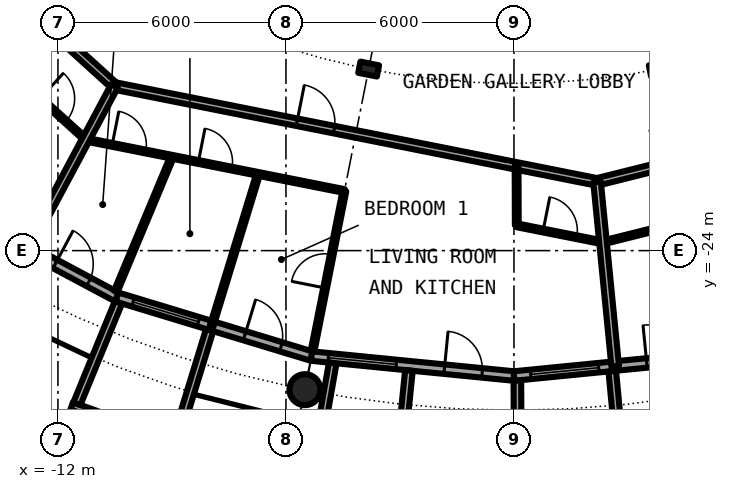
"""IFC4 building model, lengths in metres.
Left out: names, types, materials, properties, quantities, classifications, styles, units other than length and angle.
Written with IfcOpenShell. Run it as: python <this file> out.ifc"""

import sys

from ifc_helpers import new_model, si_unit, direction, frame, frame_2d, origin, origin_2d, place, context, subcontext, project, spatial, rectangle, circle, hollow_circle, i_section, extrude, element, fill, save


model = new_model("IFC4")
c1 = context("Model", 3, precision=1e-05, world=origin(), true_north=direction((0.0, 1.0)))
c2 = subcontext(c1, "Body", "Model", "MODEL_VIEW")
j1 = project(units=[si_unit("LENGTHUNIT", "METRE"), si_unit("PLANEANGLEUNIT", "RADIAN")], contexts=[c1])
p1 = place(None, origin())
s1 = spatial("IfcSite", under=j1, at=p1, CompositionType="ELEMENT")
p2 = place(p1, origin())
s2 = spatial("IfcBuilding", under=s1, at=p2, CompositionType="ELEMENT")
p3 = place(p2, frame((0.0, 0.0, 151.3)))
s3 = spatial("IfcBuildingStorey", under=s2, at=p3, CompositionType="ELEMENT", Elevation=151.3)
p4 = place(p3, frame((-5.501, -27.658, 0.0), z_axis=(0.0, 0.0, 1.0), x_axis=(1.0, 0.0, 0.0)))
e1 = element("IfcColumn", 1, at=p4, inside=s3, PredefinedType="COLUMN", context=c2, shape_type="SweptSolid", body=[
    extrude(hollow_circle(Radius=0.406, WallThickness=0.04, at=origin_2d()), origin(), (0.0, 0.0, 1.0), 3.05),
])
for number, where, z_axis, x_axis in (
    (2, (-3.824, -19.223, 0.0), (0.0, 0.0, 1.0), (-0.195, -0.981, 0.0)),
    (3, (3.824, -19.223, 0.0), (0.0, 0.0, 1.0), (0.195, -0.981, 0.0)),
):
    element("IfcColumn", number, at=place(p3, frame(where, z_axis=z_axis, x_axis=x_axis)), inside=s3, PredefinedType="COLUMN", context=c2, shape_type="SweptSolid", body=[
        extrude(i_section(OverallWidth=0.3, OverallDepth=0.5, WebThickness=0.014, FlangeThickness=0.028, FilletRadius=0.027, at=origin_2d()), origin(), (0.0, 0.0, 1.0), 3.05),
    ])
p5 = place(p3, frame((-15.167, -22.699, 0.0), z_axis=(0.0, 0.0, 1.0), x_axis=(0.881915646801, -0.471407246368, 0.0)))
e4 = element("IfcWall", 4, at=p5, inside=s3, PredefinedType="SOLIDWALL", context=c2, shape_type="SweptSolid", body=[
    extrude(rectangle(XDim=5.352, YDim=0.25, at=frame_2d((2.676, 0.0))), origin(), (0.0, 0.0, 1.0), 2.7),
])
p6 = place(p5, frame((0.441, 0.0, 0.3)))
e5 = element("IfcOpeningElement", 5, at=p6, cuts=e4, PredefinedType="OPENING", context=c2, shape_type="SweptSolid", body=[
    extrude(rectangle(XDim=1.8, YDim=2.1, at=frame_2d((0.9, 1.05))), frame((0.0, 0.135, 0.0), z_axis=(0.0, -1.0, 0.0), x_axis=(1.0, 0.0, 0.0)), (0.0, 0.0, 1.0), 0.27),
])
p7 = place(p5, frame((3.51, 0.0, 0.0)))
e6 = element("IfcOpeningElement", 6, at=p7, cuts=e4, PredefinedType="OPENING", context=c2, shape_type="SweptSolid", body=[
    extrude(rectangle(XDim=1.0, YDim=2.2, at=frame_2d((0.5, 1.1))), frame((0.0, 0.135, 0.0), z_axis=(0.0, -1.0, 0.0), x_axis=(1.0, 0.0, 0.0)), (0.0, 0.0, 1.0), 0.27),
])
p8 = place(p3, frame((-10.447, -25.222, 0.0), z_axis=(0.0, 0.0, 1.0), x_axis=(0.956965678721, -0.290201119486, 0.0)))
e7 = element("IfcWall", 7, at=p8, inside=s3, PredefinedType="SOLIDWALL", context=c2, shape_type="SweptSolid", body=[
    extrude(rectangle(XDim=5.351, YDim=0.25, at=frame_2d((2.676, 0.0))), origin(), (0.0, 0.0, 1.0), 2.7),
])
p9 = place(p8, frame((0.441, 0.0, 0.3)))
e8 = element("IfcOpeningElement", 8, at=p9, cuts=e7, PredefinedType="OPENING", context=c2, shape_type="SweptSolid", body=[
    extrude(rectangle(XDim=1.8, YDim=2.1, at=frame_2d((0.9, 1.05))), frame((0.0, 0.135, 0.0), z_axis=(0.0, -1.0, 0.0), x_axis=(1.0, 0.0, 0.0)), (0.0, 0.0, 1.0), 0.27),
])
p10 = place(p8, frame((3.51, 0.0, 0.0)))
e9 = element("IfcOpeningElement", 9, at=p10, cuts=e7, PredefinedType="OPENING", context=c2, shape_type="SweptSolid", body=[
    extrude(rectangle(XDim=1.0, YDim=2.2, at=frame_2d((0.5, 1.1))), frame((0.0, 0.135, 0.0), z_axis=(0.0, -1.0, 0.0), x_axis=(1.0, 0.0, 0.0)), (0.0, 0.0, 1.0), 0.27),
])
p11 = place(p3, frame((-11.638, -28.084, -0.03), z_axis=(0.0, 0.0, 1.0), x_axis=(0.941461077774, -0.337121697664, 0.0)))
e10 = element("IfcWall", 10, at=p11, inside=s3, PredefinedType="SOLIDWALL", context=c2, shape_type="SweptSolid", body=[
    extrude(rectangle(XDim=2.993, YDim=0.2, at=frame_2d((1.497, 0.0))), origin(), (0.0, 0.0, 1.0), 2.73),
])
p12 = place(p11, frame((0.457, 0.0, 0.33)))
e11 = element("IfcOpeningElement", 11, at=p12, cuts=e10, PredefinedType="OPENING", context=c2, shape_type="SweptSolid", body=[
    extrude(circle(Radius=1.04, at=frame_2d((1.04, 1.04))), frame((0.0, 0.11, 0.0), z_axis=(0.0, -1.0, 0.0), x_axis=(1.0, 0.0, 0.0)), (0.0, 0.0, 1.0), 0.22),
])
p13 = place(p3, frame((-10.409, -25.364, -0.03), z_axis=(0.0, 0.0, 1.0), x_axis=(-0.379509886562, -0.925187681501, 0.0)))
e12 = element("IfcWall", 12, at=p13, inside=s3, PredefinedType="SOLIDWALL", context=c2, shape_type="SweptSolid", body=[
    extrude(rectangle(XDim=2.883, YDim=0.2, at=frame_2d((1.441, 0.0))), origin(), (0.0, 0.0, 1.0), 2.73),
])
p14 = place(p3, frame((-8.009, -26.092, -0.03), z_axis=(0.0, 0.0, 1.0), x_axis=(-0.293406695073, -0.955987715029, 0.0)))
e13 = element("IfcWall", 13, at=p14, inside=s3, PredefinedType="SOLIDWALL", context=c2, shape_type="SweptSolid", body=[
    extrude(rectangle(XDim=3.006, YDim=0.2, at=frame_2d((1.503, 0.0))), origin(), (0.0, 0.0, 1.0), 2.73),
])
p15 = place(p3, frame((-5.326, -26.775, 0.0), z_axis=(0.0, 0.0, 1.0), x_axis=(0.995173996315, -0.098126026407, 0.0)))
e14 = element("IfcWall", 14, at=p15, inside=s3, PredefinedType="SOLIDWALL", context=c2, shape_type="SweptSolid", body=[
    extrude(rectangle(XDim=5.352, YDim=0.25, at=frame_2d((2.676, 0.0))), origin(), (0.0, 0.0, 1.0), 2.7),
])
p16 = place(p15, frame((0.441, 0.0, 0.3)))
e15 = element("IfcOpeningElement", 15, at=p16, cuts=e14, PredefinedType="OPENING", context=c2, shape_type="SweptSolid", body=[
    extrude(rectangle(XDim=1.8, YDim=2.1, at=frame_2d((0.9, 1.05))), frame((0.0, 0.135, 0.0), z_axis=(0.0, -1.0, 0.0), x_axis=(1.0, 0.0, 0.0)), (0.0, 0.0, 1.0), 0.27),
])
p17 = place(p15, frame((3.51, 0.0, 0.0)))
e16 = element("IfcOpeningElement", 16, at=p17, cuts=e14, PredefinedType="OPENING", context=c2, shape_type="SweptSolid", body=[
    extrude(rectangle(XDim=1.0, YDim=2.2, at=frame_2d((0.5, 1.1))), frame((0.0, 0.135, 0.0), z_axis=(0.0, -1.0, 0.0), x_axis=(1.0, 0.0, 0.0)), (0.0, 0.0, 1.0), 0.27),
])
p18 = place(p3, frame((-4.769, -26.956, -0.03), z_axis=(0.0, 0.0, 1.0), x_axis=(-0.174056778901, -0.984735618183, 0.0)))
e17 = element("IfcWall", 17, at=p18, inside=s3, PredefinedType="SOLIDWALL", context=c2, shape_type="SweptSolid", body=[
    extrude(rectangle(XDim=2.925, YDim=0.2, at=frame_2d((1.462, 0.0))), origin(), (0.0, 0.0, 1.0), 2.73),
])
p19 = place(p3, frame((-2.764, -27.153, -0.03), z_axis=(0.0, 0.0, 1.0), x_axis=(-0.101505487237, -0.994834979311, 0.0)))
e18 = element("IfcWall", 18, at=p19, inside=s3, PredefinedType="SOLIDWALL", context=c2, shape_type="SweptSolid", body=[
    extrude(rectangle(XDim=3.007, YDim=0.2, at=frame_2d((1.503, 0.0))), origin(), (0.0, 0.0, 1.0), 2.73),
])
p20 = place(p3, frame((0.0, -27.3, 0.0), z_axis=(0.0, 0.0, 1.0), x_axis=(0.995173996315, 0.098126026407, 0.0)))
e19 = element("IfcWall", 19, at=p20, inside=s3, PredefinedType="SOLIDWALL", context=c2, shape_type="SweptSolid", body=[
    extrude(rectangle(XDim=5.352, YDim=0.25, at=frame_2d((2.676, 0.0))), origin(), (0.0, 0.0, 1.0), 2.7),
])
p21 = place(p20, frame((0.441, 0.0, 0.3)))
e20 = element("IfcOpeningElement", 20, at=p21, cuts=e19, PredefinedType="OPENING", context=c2, shape_type="SweptSolid", body=[
    extrude(rectangle(XDim=1.8, YDim=2.1, at=frame_2d((0.9, 1.05))), frame((0.0, 0.135, 0.0), z_axis=(0.0, -1.0, 0.0), x_axis=(1.0, 0.0, 0.0)), (0.0, 0.0, 1.0), 0.27),
])
p22 = place(p20, frame((3.51, 0.0, 0.0)))
e21 = element("IfcOpeningElement", 21, at=p22, cuts=e19, PredefinedType="OPENING", context=c2, shape_type="SweptSolid", body=[
    extrude(rectangle(XDim=1.0, YDim=2.2, at=frame_2d((0.5, 1.1))), frame((0.0, 0.135, 0.0), z_axis=(0.0, -1.0, 0.0), x_axis=(1.0, 0.0, 0.0)), (0.0, 0.0, 1.0), 0.27),
])
p23 = place(p3, frame((0.09, -27.417, -0.03), z_axis=(0.0, 0.0, 1.0), x_axis=(0.00347308367, -0.999993968827, 0.0)))
e22 = element("IfcWall", 22, at=p23, inside=s3, PredefinedType="SOLIDWALL", context=c2, shape_type="SweptSolid", body=[
    extrude(rectangle(XDim=2.882, YDim=0.2, at=frame_2d((1.441, 0.0))), origin(), (0.0, 0.0, 1.0), 2.73),
])
p24 = place(p3, frame((2.586, -27.171, -0.03), z_axis=(0.0, 0.0, 1.0), x_axis=(0.094548432284, -0.995520262954, 0.0)))
e23 = element("IfcWall", 23, at=p24, inside=s3, PredefinedType="SOLIDWALL", context=c2, shape_type="SweptSolid", body=[
    extrude(rectangle(XDim=3.006, YDim=0.2, at=frame_2d((1.503, 0.0))), origin(), (0.0, 0.0, 1.0), 2.73),
])
p25 = place(p3, frame((2.341, -23.785, 0.0), z_axis=(0.0, 0.0, 1.0), x_axis=(0.970124059177, 0.242609376996, 0.0)))
e24 = element("IfcWall", 24, at=p25, inside=s3, PredefinedType="PARTITIONING", context=c2, shape_type="SweptSolid", body=[
    extrude(rectangle(XDim=2.337, YDim=0.1, at=frame_2d((1.168, 0.0))), origin(), (0.0, 0.0, 1.0), 2.7),
])
p26 = place(p3, frame((-12.988, -19.518, 0.0), z_axis=(0.0, 0.0, 1.0), x_axis=(0.741132356378, -0.671358942988, 0.0)))
e25 = element("IfcWall", 25, at=p26, inside=s3, PredefinedType="PARTITIONING", context=c2, shape_type="SweptSolid", body=[
    extrude(rectangle(XDim=2.323, YDim=0.1, at=frame_2d((1.162, 0.0))), origin(), (0.0, 0.0, 1.0), 2.7),
])
p27 = place(p26, frame((0.712, 0.0, 0.0)))
e26 = element("IfcOpeningElement", 26, at=p27, cuts=e25, PredefinedType="OPENING", context=c2, shape_type="SweptSolid", body=[
    extrude(rectangle(XDim=0.9, YDim=2.3, at=frame_2d((0.45, 1.15))), frame((0.0, 0.06, 0.0), z_axis=(0.0, -1.0, 0.0), x_axis=(1.0, 0.0, 0.0)), (0.0, 0.0, 1.0), 0.12),
])
p28 = place(p3, frame((-11.264, -21.08, 0.0), z_axis=(0.0, 0.0, 1.0), x_axis=(0.980795304313, -0.195039921651, 0.0)))
e27 = element("IfcWall", 27, at=p28, inside=s3, PredefinedType="PARTITIONING", context=c2, shape_type="SweptSolid", body=[
    extrude(rectangle(XDim=6.937, YDim=0.1, at=frame_2d((3.469, 0.0))), origin(), (0.0, 0.0, 1.0), 2.7),
])
p29 = place(p28, frame((3.016, 0.0, 0.0)))
e28 = element("IfcOpeningElement", 28, at=p29, cuts=e27, PredefinedType="OPENING", context=c2, shape_type="SweptSolid", body=[
    extrude(rectangle(XDim=0.9, YDim=2.3, at=frame_2d((0.45, 1.15))), frame((0.0, 0.06, 0.0), z_axis=(0.0, -1.0, 0.0), x_axis=(1.0, 0.0, 0.0)), (0.0, 0.0, 1.0), 0.12),
])
p30 = place(p28, frame((0.704, 0.0, 0.0)))
e29 = element("IfcOpeningElement", 29, at=p30, cuts=e27, PredefinedType="OPENING", context=c2, shape_type="SweptSolid", body=[
    extrude(rectangle(XDim=0.9, YDim=2.3, at=frame_2d((0.45, 1.15))), frame((0.0, 0.06, 0.0), z_axis=(0.0, -1.0, 0.0), x_axis=(1.0, 0.0, 0.0)), (0.0, 0.0, 1.0), 0.12),
])
p31 = place(p3, frame((0.074, -23.334, 0.0), z_axis=(0.0, 0.0, 1.0), x_axis=(0.98081942231, -0.194918600496, 0.0)))
e30 = element("IfcWall", 30, at=p31, inside=s3, PredefinedType="PARTITIONING", context=c2, shape_type="SweptSolid", body=[
    extrude(rectangle(XDim=2.313, YDim=0.1, at=frame_2d((1.157, 0.0))), origin(), (0.0, 0.0, 1.0), 2.7),
])
p32 = place(p31, frame((0.707, 0.0, 0.0)))
e31 = element("IfcOpeningElement", 31, at=p32, cuts=e30, PredefinedType="OPENING", context=c2, shape_type="SweptSolid", body=[
    extrude(rectangle(XDim=0.9, YDim=2.3, at=frame_2d((0.45, 1.15))), frame((0.0, 0.06, 0.0), z_axis=(0.0, -1.0, 0.0), x_axis=(1.0, 0.0, 0.0)), (0.0, 0.0, 1.0), 0.12),
])
p33 = place(p3, frame((2.186, -22.193, 0.0), z_axis=(0.0, 0.0, 1.0), x_axis=(0.97003047456, 0.242983288366, 0.0)))
e32 = element("IfcWall", 32, at=p33, inside=s3, PredefinedType="PARTITIONING", context=c2, shape_type="SweptSolid", body=[
    extrude(rectangle(XDim=6.544, YDim=0.2, at=frame_2d((3.272, 0.0))), origin(), (0.0, 0.0, 1.0), 2.7),
])
p34 = place(p33, frame((1.681, 0.0, 0.0)))
e33 = element("IfcOpeningElement", 33, at=p34, cuts=e32, PredefinedType="OPENING", context=c2, shape_type="SweptSolid", body=[
    extrude(rectangle(XDim=1.0, YDim=2.3, at=frame_2d((0.5, 1.15))), frame((0.0, 0.11, 0.0), z_axis=(0.0, -1.0, 0.0), x_axis=(1.0, 0.0, 0.0)), (0.0, 0.0, 1.0), 0.22),
])
p35 = place(p3, frame((-18.542, -12.389, 0.0), z_axis=(0.0, 0.0, 1.0), x_axis=(0.740979597636, -0.671527539188, 0.0)))
e34 = element("IfcWall", 34, at=p35, inside=s3, PredefinedType="PARTITIONING", context=c2, shape_type="SweptSolid", body=[
    extrude(rectangle(XDim=10.841, YDim=0.2, at=frame_2d((5.42, 0.0))), origin(), (0.0, 0.0, 1.0), 2.7),
])
p36 = place(p35, frame((3.835, 0.0, 0.0)))
e35 = element("IfcOpeningElement", 35, at=p36, cuts=e34, PredefinedType="OPENING", context=c2, shape_type="SweptSolid", body=[
    extrude(rectangle(XDim=1.0, YDim=2.3, at=frame_2d((0.5, 1.15))), frame((0.0, 0.11, 0.0), z_axis=(0.0, -1.0, 0.0), x_axis=(1.0, 0.0, 0.0)), (0.0, 0.0, 1.0), 0.22),
])
p37 = place(p3, frame((-10.512, -19.667, 0.0), z_axis=(0.0, 0.0, 1.0), x_axis=(0.980780341017, -0.195115152343, 0.0)))
e36 = element("IfcWall", 36, at=p37, inside=s3, PredefinedType="PARTITIONING", context=c2, shape_type="SweptSolid", body=[
    extrude(rectangle(XDim=12.947, YDim=0.2, at=frame_2d((6.473, 0.0))), origin(), (0.0, 0.0, 1.0), 2.7),
])
p38 = place(p37, frame((4.894, 0.0, 0.0)))
e37 = element("IfcOpeningElement", 37, at=p38, cuts=e36, PredefinedType="OPENING", context=c2, shape_type="SweptSolid", body=[
    extrude(rectangle(XDim=1.0, YDim=2.3, at=frame_2d((0.5, 1.15))), frame((0.0, 0.11, 0.0), z_axis=(0.0, -1.0, 0.0), x_axis=(1.0, 0.0, 0.0)), (0.0, 0.0, 1.0), 0.22),
])
p39 = place(p3, frame((-12.988, -19.518, 0.0), z_axis=(0.0, 0.0, 1.0), x_axis=(0.554125989098, 0.832432813028, 0.0)))
e38 = element("IfcWall", 38, at=p39, inside=s3, PredefinedType="PARTITIONING", context=c2, shape_type="SweptSolid", body=[
    extrude(rectangle(XDim=1.57, YDim=0.1, at=frame_2d((0.785, 0.0))), origin(), (0.0, 0.0, 1.0), 2.7),
])
p40 = place(p3, frame((-12.81, -23.966, 0.0), z_axis=(0.0, 0.0, 1.0), x_axis=(0.471427642527, 0.881904744211, 0.0)))
e39 = element("IfcWall", 39, at=p40, inside=s3, PredefinedType="PARTITIONING", context=c2, shape_type="SweptSolid", body=[
    extrude(rectangle(XDim=4.875, YDim=0.2, at=frame_2d((2.438, 0.0))), origin(), (0.0, 0.0, 1.0), 2.7),
])
p41 = place(p3, frame((-10.479, -25.073, 0.0), z_axis=(0.0, 0.0, 1.0), x_axis=(0.385572005139, 0.922677749192, 0.0)))
e40 = element("IfcWall", 40, at=p41, inside=s3, PredefinedType="PARTITIONING", context=c2, shape_type="SweptSolid", body=[
    extrude(rectangle(XDim=3.841, YDim=0.1, at=frame_2d((1.92, 0.0))), origin(), (0.0, 0.0, 1.0), 2.7),
])
p42 = place(p3, frame((-7.956, -25.984, 0.0), z_axis=(0.0, 0.0, 1.0), x_axis=(0.292799128207, 0.956173975028, 0.0)))
e41 = element("IfcWall", 41, at=p42, inside=s3, PredefinedType="PARTITIONING", context=c2, shape_type="SweptSolid", body=[
    extrude(rectangle(XDim=4.188, YDim=0.1, at=frame_2d((2.094, 0.0))), origin(), (0.0, 0.0, 1.0), 2.7),
])
p43 = place(p3, frame((-5.302, -26.653, 0.0), z_axis=(0.0, 0.0, 1.0), x_axis=(0.195145394338, 0.98077432423, 0.0)))
e42 = element("IfcWall", 42, at=p43, inside=s3, PredefinedType="PARTITIONING", context=c2, shape_type="SweptSolid", body=[
    extrude(rectangle(XDim=4.305, YDim=0.1, at=frame_2d((2.152, 0.0))), origin(), (0.0, 0.0, 1.0), 2.7),
])
p44 = place(p43, frame((1.702, 0.0, 0.0)))
e43 = element("IfcOpeningElement", 43, at=p44, cuts=e42, PredefinedType="OPENING", context=c2, shape_type="SweptSolid", body=[
    extrude(rectangle(XDim=0.9, YDim=2.3, at=frame_2d((0.45, 1.15))), frame((0.0, 0.06, 0.0), z_axis=(0.0, -1.0, 0.0), x_axis=(1.0, 0.0, 0.0)), (0.0, 0.0, 1.0), 0.12),
])
p45 = place(p3, frame((0.074, -23.334, 0.0), z_axis=(0.0, 0.0, 1.0), x_axis=(-0.003125961595, 0.99999511417, 0.0)))
e44 = element("IfcWall", 44, at=p45, inside=s3, PredefinedType="PARTITIONING", context=c2, shape_type="SweptSolid", body=[
    extrude(rectangle(XDim=1.562, YDim=0.1, at=frame_2d((0.781, 0.0))), origin(), (0.0, 0.0, 1.0), 2.7),
])
p46 = place(p3, frame((2.186, -22.193, 0.0), z_axis=(0.0, 0.0, 1.0), x_axis=(0.098070432075, -0.995179476453, 0.0)))
e45 = element("IfcWall", 45, at=p46, inside=s3, PredefinedType="PARTITIONING", context=c2, shape_type="SweptSolid", body=[
    extrude(rectangle(XDim=4.874, YDim=0.2, at=frame_2d((2.437, 0.0))), origin(), (0.0, 0.0, 1.0), 2.7),
])
p47 = place(p7, origin())
e46 = element("IfcDoor", 46, at=p47, inside=s3, OperationType="SINGLE_SWING_LEFT", PredefinedType="DOOR", context=c2, shape_type="SweptSolid", body=[
    extrude(rectangle(XDim=1.0, YDim=2.2, at=frame_2d((0.5, 1.1))), frame((0.0, 0.025, 0.0), z_axis=(0.0, -1.0, 0.0), x_axis=(1.0, 0.0, 0.0)), (0.0, 0.0, 1.0), 0.05),
])
fill(e6, e46)
p48 = place(p9, origin())
e47 = element("IfcWindow", 47, at=p48, inside=s3, PartitioningType="SINGLE_PANEL", PredefinedType="WINDOW", context=c2, shape_type="SweptSolid", body=[
    extrude(rectangle(XDim=1.8, YDim=2.1, at=frame_2d((0.9, 1.05))), frame((0.0, 0.03, 0.0), z_axis=(0.0, -1.0, 0.0), x_axis=(1.0, 0.0, 0.0)), (0.0, 0.0, 1.0), 0.06),
])
fill(e8, e47)
p49 = place(p10, origin())
e48 = element("IfcDoor", 48, at=p49, inside=s3, OperationType="SINGLE_SWING_LEFT", PredefinedType="DOOR", context=c2, shape_type="SweptSolid", body=[
    extrude(rectangle(XDim=1.0, YDim=2.2, at=frame_2d((0.5, 1.1))), frame((0.0, 0.025, 0.0), z_axis=(0.0, -1.0, 0.0), x_axis=(1.0, 0.0, 0.0)), (0.0, 0.0, 1.0), 0.05),
])
fill(e9, e48)
p50 = place(p16, origin())
e49 = element("IfcWindow", 49, at=p50, inside=s3, PartitioningType="SINGLE_PANEL", PredefinedType="WINDOW", context=c2, shape_type="SweptSolid", body=[
    extrude(rectangle(XDim=1.8, YDim=2.1, at=frame_2d((0.9, 1.05))), frame((0.0, 0.03, 0.0), z_axis=(0.0, -1.0, 0.0), x_axis=(1.0, 0.0, 0.0)), (0.0, 0.0, 1.0), 0.06),
])
fill(e15, e49)
p51 = place(p17, origin())
e50 = element("IfcDoor", 50, at=p51, inside=s3, OperationType="SINGLE_SWING_LEFT", PredefinedType="DOOR", context=c2, shape_type="SweptSolid", body=[
    extrude(rectangle(XDim=1.0, YDim=2.2, at=frame_2d((0.5, 1.1))), frame((0.0, 0.025, 0.0), z_axis=(0.0, -1.0, 0.0), x_axis=(1.0, 0.0, 0.0)), (0.0, 0.0, 1.0), 0.05),
])
fill(e16, e50)
p52 = place(p21, origin())
e51 = element("IfcWindow", 51, at=p52, inside=s3, PartitioningType="SINGLE_PANEL", PredefinedType="WINDOW", context=c2, shape_type="SweptSolid", body=[
    extrude(rectangle(XDim=1.8, YDim=2.1, at=frame_2d((0.9, 1.05))), frame((0.0, 0.03, 0.0), z_axis=(0.0, -1.0, 0.0), x_axis=(1.0, 0.0, 0.0)), (0.0, 0.0, 1.0), 0.06),
])
fill(e20, e51)
p53 = place(p22, origin())
e52 = element("IfcDoor", 52, at=p53, inside=s3, OperationType="SINGLE_SWING_LEFT", PredefinedType="DOOR", context=c2, shape_type="SweptSolid", body=[
    extrude(rectangle(XDim=1.0, YDim=2.2, at=frame_2d((0.5, 1.1))), frame((0.0, 0.025, 0.0), z_axis=(0.0, -1.0, 0.0), x_axis=(1.0, 0.0, 0.0)), (0.0, 0.0, 1.0), 0.05),
])
fill(e21, e52)
p54 = place(p27, origin())
e53 = element("IfcDoor", 53, at=p54, inside=s3, OperationType="SINGLE_SWING_RIGHT", PredefinedType="DOOR", context=c2, shape_type="SweptSolid", body=[
    extrude(rectangle(XDim=0.9, YDim=2.3, at=frame_2d((0.45, 1.15))), frame((0.0, 0.025, 0.0), z_axis=(0.0, -1.0, 0.0), x_axis=(1.0, 0.0, 0.0)), (0.0, 0.0, 1.0), 0.05),
])
fill(e26, e53)
p55 = place(p38, origin())
e54 = element("IfcDoor", 54, at=p55, inside=s3, OperationType="SINGLE_SWING_LEFT", PredefinedType="DOOR", context=c2, shape_type="SweptSolid", body=[
    extrude(rectangle(XDim=1.0, YDim=2.3, at=frame_2d((0.5, 1.15))), frame((0.0, 0.025, 0.0), z_axis=(0.0, -1.0, 0.0), x_axis=(1.0, 0.0, 0.0)), (0.0, 0.0, 1.0), 0.05),
])
fill(e37, e54)
p56 = place(p32, origin())
e55 = element("IfcDoor", 55, at=p56, inside=s3, OperationType="SINGLE_SWING_RIGHT", PredefinedType="DOOR", context=c2, shape_type="SweptSolid", body=[
    extrude(rectangle(XDim=0.9, YDim=2.3, at=frame_2d((0.45, 1.15))), frame((0.0, 0.025, 0.0), z_axis=(0.0, -1.0, 0.0), x_axis=(1.0, 0.0, 0.0)), (0.0, 0.0, 1.0), 0.05),
])
fill(e31, e55)
p57 = place(p44, origin())
e56 = element("IfcDoor", 56, at=p57, inside=s3, OperationType="SINGLE_SWING_LEFT", PredefinedType="DOOR", context=c2, shape_type="SweptSolid", body=[
    extrude(rectangle(XDim=0.9, YDim=2.3, at=frame_2d((0.45, 1.15))), frame((0.0, 0.025, 0.0), z_axis=(0.0, -1.0, 0.0), x_axis=(1.0, 0.0, 0.0)), (0.0, 0.0, 1.0), 0.05),
])
fill(e43, e56)
p58 = place(p29, origin())
e57 = element("IfcDoor", 57, at=p58, inside=s3, OperationType="SINGLE_SWING_LEFT", PredefinedType="DOOR", context=c2, shape_type="SweptSolid", body=[
    extrude(rectangle(XDim=0.9, YDim=2.3, at=frame_2d((0.45, 1.15))), frame((0.0, 0.025, 0.0), z_axis=(0.0, -1.0, 0.0), x_axis=(1.0, 0.0, 0.0)), (0.0, 0.0, 1.0), 0.05),
])
fill(e28, e57)
p59 = place(p30, origin())
e58 = element("IfcDoor", 58, at=p59, inside=s3, OperationType="SINGLE_SWING_LEFT", PredefinedType="DOOR", context=c2, shape_type="SweptSolid", body=[
    extrude(rectangle(XDim=0.9, YDim=2.3, at=frame_2d((0.45, 1.15))), frame((0.0, 0.025, 0.0), z_axis=(0.0, -1.0, 0.0), x_axis=(1.0, 0.0, 0.0)), (0.0, 0.0, 1.0), 0.05),
])
fill(e29, e58)
save(model, sys.argv[1])
